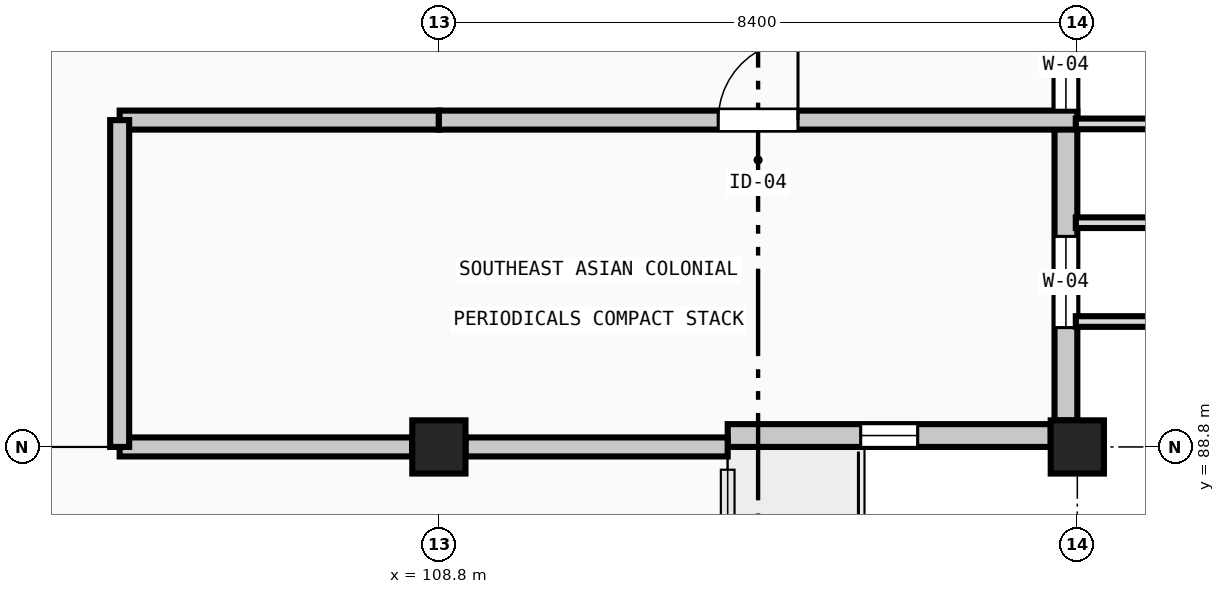
"""IFC4 building model, lengths in metres.
Left out: names, types, materials, properties, quantities, classifications, styles, units other than length and angle.
Written with IfcOpenShell. Run it as: python <this file> out.ifc"""

import sys

from ifc_helpers import new_model, si_unit, direction, frame, frame_2d, origin, origin_2d, place, context, subcontext, project, spatial, rectangle, extrude, element, fill, save


model = new_model("IFC4")
c1 = context("Model", 3, precision=1e-05, world=origin(), true_north=direction((0.0, 1.0)))
c2 = subcontext(c1, "Body", "Model", "MODEL_VIEW")
j1 = project(units=[si_unit("LENGTHUNIT", "METRE"), si_unit("PLANEANGLEUNIT", "RADIAN")], contexts=[c1])
p1 = place(None, origin())
s1 = spatial("IfcSite", under=j1, at=p1, CompositionType="ELEMENT")
p2 = place(p1, origin())
s2 = spatial("IfcBuilding", under=s1, at=p2, CompositionType="ELEMENT")
p3 = place(p2, frame((0.0, 0.0, 23.36)))
s3 = spatial("IfcBuildingStorey", under=s2, at=p3, CompositionType="ELEMENT", Elevation=23.36)
for number, where, z_axis, x_axis in (
    (1, (108.8, 88.8, 0.0), (0.0, 0.0, 1.0), (1.0, 0.0, 0.0)),
    (2, (117.2, 88.8, 0.0), (0.0, 0.0, 1.0), (1.0, 0.0, 0.0)),
):
    element("IfcColumn", number, at=place(p3, frame(where, z_axis=z_axis, x_axis=x_axis)), inside=s3, PredefinedType="COLUMN", context=c2, shape_type="SweptSolid", body=[
        extrude(rectangle(XDim=0.7, YDim=0.7, at=origin_2d()), origin(), (0.0, 0.0, 1.0), 4.48),
    ])
p4 = place(p3, frame((117.05, 95.65, 0.0), z_axis=(0.0, 0.0, 1.0), x_axis=(0.0, -1.0, 0.0)))
e3 = element("IfcWall", 3, at=p4, inside=s3, PredefinedType="SOLIDWALL", context=c2, shape_type="SweptSolid", body=[
    extrude(rectangle(XDim=6.5, YDim=0.3, at=frame_2d((3.25, 0.0))), origin(), (0.0, 0.0, 1.0), 3.13),
])
p5 = place(p4, frame((1.22, 0.0, 0.9)))
e4 = element("IfcOpeningElement", 4, at=p5, cuts=e3, PredefinedType="OPENING", context=c2, shape_type="SweptSolid", body=[
    extrude(rectangle(XDim=1.2, YDim=1.8, at=frame_2d((0.6, 0.9))), frame((0.0, 0.16, 0.0), z_axis=(0.0, -1.0, 0.0), x_axis=(1.0, 0.0, 0.0)), (0.0, 0.0, 1.0), 0.32),
])
p6 = place(p4, frame((4.08, 0.0, 0.9)))
e5 = element("IfcOpeningElement", 5, at=p6, cuts=e3, PredefinedType="OPENING", context=c2, shape_type="SweptSolid", body=[
    extrude(rectangle(XDim=1.2, YDim=1.8, at=frame_2d((0.6, 0.9))), frame((0.0, 0.16, 0.0), z_axis=(0.0, -1.0, 0.0), x_axis=(1.0, 0.0, 0.0)), (0.0, 0.0, 1.0), 0.32),
])
p7 = place(p3, frame((116.85, 88.95, 0.0), z_axis=(0.0, 0.0, 1.0), x_axis=(-1.0, 0.0, 0.0)))
e6 = element("IfcWall", 6, at=p7, inside=s3, PredefinedType="SOLIDWALL", context=c2, shape_type="SweptSolid", body=[
    extrude(rectangle(XDim=4.25, YDim=0.3, at=frame_2d((2.125, 0.0))), origin(), (0.0, 0.0, 1.0), 3.53),
])
p8 = place(p7, frame((1.75, 0.0, 0.9)))
e7 = element("IfcOpeningElement", 7, at=p8, cuts=e6, PredefinedType="OPENING", context=c2, shape_type="SweptSolid", body=[
    extrude(rectangle(XDim=0.75, YDim=2.4, at=frame_2d((0.375, 1.2))), frame((0.0, 0.16, 0.0), z_axis=(0.0, -1.0, 0.0), x_axis=(1.0, 0.0, 0.0)), (0.0, 0.0, 1.0), 0.32),
])
p9 = place(p3, frame((104.6, 93.1, 0.0), z_axis=(0.0, 0.0, 1.0), x_axis=(1.0, 0.0, 0.0)))
e8 = element("IfcWall", 8, at=p9, inside=s3, PredefinedType="SOLIDWALL", context=c2, shape_type="SweptSolid", body=[
    extrude(rectangle(XDim=4.2, YDim=0.25, at=frame_2d((2.1, 0.0))), origin(), (0.0, 0.0, 1.0), 3.13),
])
p10 = place(p3, frame((108.8, 93.1, 0.0), z_axis=(0.0, 0.0, 1.0), x_axis=(1.0, 0.0, 0.0)))
e9 = element("IfcWall", 9, at=p10, inside=s3, PredefinedType="SOLIDWALL", context=c2, shape_type="SweptSolid", body=[
    extrude(rectangle(XDim=8.4, YDim=0.25, at=frame_2d((4.2, 0.0))), origin(), (0.0, 0.0, 1.0), 3.13),
])
p11 = place(p10, frame((3.675, 0.0, 0.0)))
e10 = element("IfcOpeningElement", 10, at=p11, cuts=e9, PredefinedType="OPENING", context=c2, shape_type="SweptSolid", body=[
    extrude(rectangle(XDim=1.05, YDim=2.2, at=frame_2d((0.525, 1.1))), frame((0.0, 0.135, 0.0), z_axis=(0.0, -1.0, 0.0), x_axis=(1.0, 0.0, 0.0)), (0.0, 0.0, 1.0), 0.27),
])
p12 = place(p3, frame((112.6, 88.8, 0.0), z_axis=(0.0, 0.0, 1.0), x_axis=(-1.0, 0.0, 0.0)))
e11 = element("IfcWall", 11, at=p12, inside=s3, PredefinedType="SOLIDWALL", context=c2, shape_type="SweptSolid", body=[
    extrude(rectangle(XDim=3.45, YDim=0.25, at=frame_2d((1.725, 0.0))), origin(), (0.0, 0.0, 1.0), 3.53),
])
p13 = place(p3, frame((108.45, 88.8, 0.0), z_axis=(0.0, 0.0, 1.0), x_axis=(-1.0, 0.0, 0.0)))
e12 = element("IfcWall", 12, at=p13, inside=s3, PredefinedType="SOLIDWALL", context=c2, shape_type="SweptSolid", body=[
    extrude(rectangle(XDim=3.85, YDim=0.25, at=frame_2d((1.925, 0.0))), origin(), (0.0, 0.0, 1.0), 3.53),
])
p14 = place(p3, frame((104.6, 88.8, 0.0), z_axis=(0.0, 0.0, 1.0), x_axis=(0.0, 1.0, 0.0)))
e13 = element("IfcWall", 13, at=p14, inside=s3, PredefinedType="SOLIDWALL", context=c2, shape_type="SweptSolid", body=[
    extrude(rectangle(XDim=4.3, YDim=0.25, at=frame_2d((2.15, 0.0))), origin(), (0.0, 0.0, 1.0), 3.88),
])
p15 = place(p5, origin())
e14 = element("IfcWindow", 14, at=p15, inside=s3, PartitioningType="SINGLE_PANEL", PredefinedType="WINDOW", context=c2, shape_type="SweptSolid", body=[
    extrude(rectangle(XDim=1.2, YDim=1.8, at=frame_2d((0.6, 0.9))), frame((0.0, 0.03, 0.0), z_axis=(0.0, -1.0, 0.0), x_axis=(1.0, 0.0, 0.0)), (0.0, 0.0, 1.0), 0.06),
])
fill(e4, e14)
p16 = place(p6, origin())
e15 = element("IfcWindow", 15, at=p16, inside=s3, PartitioningType="SINGLE_PANEL", PredefinedType="WINDOW", context=c2, shape_type="SweptSolid", body=[
    extrude(rectangle(XDim=1.2, YDim=1.8, at=frame_2d((0.6, 0.9))), frame((0.0, 0.03, 0.0), z_axis=(0.0, -1.0, 0.0), x_axis=(1.0, 0.0, 0.0)), (0.0, 0.0, 1.0), 0.06),
])
fill(e5, e15)
p17 = place(p8, origin())
e16 = element("IfcWindow", 16, at=p17, inside=s3, PartitioningType="SINGLE_PANEL", PredefinedType="WINDOW", context=c2, shape_type="SweptSolid", body=[
    extrude(rectangle(XDim=0.75, YDim=2.4, at=frame_2d((0.375, 1.2))), frame((0.0, 0.03, 0.0), z_axis=(0.0, -1.0, 0.0), x_axis=(1.0, 0.0, 0.0)), (0.0, 0.0, 1.0), 0.06),
])
fill(e7, e16)
p18 = place(p11, origin())
e17 = element("IfcDoor", 17, at=p18, inside=s3, OperationType="SINGLE_SWING_RIGHT", PredefinedType="DOOR", context=c2, shape_type="SweptSolid", body=[
    extrude(rectangle(XDim=1.05, YDim=2.2, at=frame_2d((0.525, 1.1))), frame((0.0, 0.025, 0.0), z_axis=(0.0, -1.0, 0.0), x_axis=(1.0, 0.0, 0.0)), (0.0, 0.0, 1.0), 0.05),
])
fill(e10, e17)
save(model, sys.argv[1])
